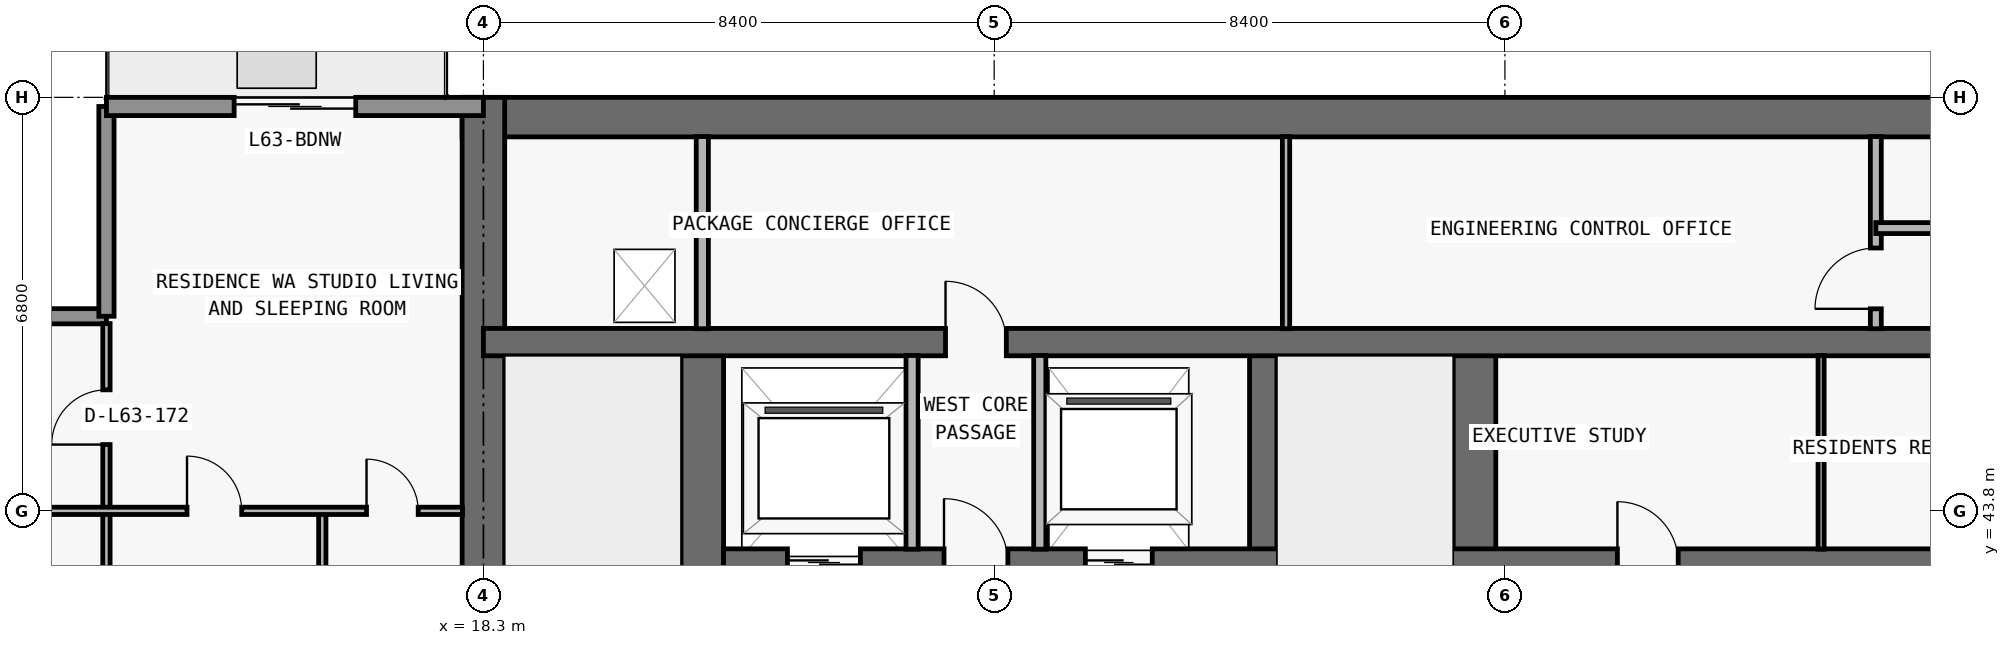
"""IFC4 building model, lengths in metres.
Left out: names, types, materials, properties, quantities, classifications, styles, units other than length and angle.
Written with IfcOpenShell. Run it as: python <this file> out.ifc"""

import sys

from ifc_helpers import new_model, si_unit, direction, frame, frame_2d, origin, place, context, subcontext, project, spatial, rectangle, extrude, element, fill, save


model = new_model("IFC4")
c1 = context("Model", 3, precision=1e-05, world=origin(), true_north=direction((0.0, 1.0)))
c2 = subcontext(c1, "Body", "Model", "MODEL_VIEW")
j1 = project(units=[si_unit("LENGTHUNIT", "METRE"), si_unit("PLANEANGLEUNIT", "RADIAN")], contexts=[c1])
p1 = place(None, origin())
s1 = spatial("IfcSite", under=j1, at=p1, CompositionType="ELEMENT")
p2 = place(p1, origin())
s2 = spatial("IfcBuilding", under=s1, at=p2, CompositionType="ELEMENT")
p3 = place(p2, frame((0.0, 0.0, 226.5)))
s3 = spatial("IfcBuildingStorey", under=s2, at=p3, CompositionType="ELEMENT", Elevation=226.5)
p4 = place(p3, frame((17.95, 50.275, 0.0), z_axis=(0.0, 0.0, 1.0), x_axis=(1.0, 0.0, 0.0)))
e1 = element("IfcWall", 1, at=p4, inside=s3, PredefinedType="SHEAR", context=c2, shape_type="SweptSolid", body=[
    extrude(rectangle(XDim=41.9, YDim=0.65, at=frame_2d((20.95, 0.0))), origin(), (0.0, 0.0, 1.0), 3.05),
])
p5 = place(p3, frame((18.3, 36.65, 0.0), z_axis=(0.0, 0.0, 1.0), x_axis=(0.0, 1.0, 0.0)))
e2 = element("IfcWall", 2, at=p5, inside=s3, PredefinedType="SHEAR", context=c2, shape_type="SweptSolid", body=[
    extrude(rectangle(XDim=13.95, YDim=0.7, at=frame_2d((6.975, 0.0))), origin(), (0.0, 0.0, 1.0), 3.05),
])
p6 = place(p3, frame((21.9, 37.0, 0.0), z_axis=(0.0, 0.0, 1.0), x_axis=(0.0, 1.0, 0.0)))
e3 = element("IfcWall", 3, at=p6, inside=s3, PredefinedType="SHEAR", context=c2, shape_type="SweptSolid", body=[
    extrude(rectangle(XDim=9.575, YDim=0.7, at=frame_2d((4.788, 0.0))), origin(), (0.0, 0.0, 1.0), 3.05),
])
p7 = place(p6, frame((0.55, 0.0, 0.0)))
e4 = element("IfcOpeningElement", 4, at=p7, cuts=e3, PredefinedType="OPENING", context=c2, shape_type="SweptSolid", body=[
    extrude(rectangle(XDim=1.1, YDim=2.15, at=frame_2d((0.55, 1.075))), frame((0.0, 0.36, 0.0), z_axis=(0.0, -1.0, 0.0), x_axis=(1.0, 0.0, 0.0)), (0.0, 0.0, 1.0), 0.72),
])
p8 = place(p3, frame((31.125, 37.0, 0.0), z_axis=(0.0, 0.0, 1.0), x_axis=(0.0, 1.0, 0.0)))
e5 = element("IfcWall", 5, at=p8, inside=s3, PredefinedType="SHEAR", context=c2, shape_type="SweptSolid", body=[
    extrude(rectangle(XDim=9.575, YDim=0.45, at=frame_2d((4.788, 0.0))), origin(), (0.0, 0.0, 1.0), 3.05),
])
p9 = place(p3, frame((34.6, 37.0, 0.0), z_axis=(0.0, 0.0, 1.0), x_axis=(0.0, 1.0, 0.0)))
e6 = element("IfcWall", 6, at=p9, inside=s3, PredefinedType="SHEAR", context=c2, shape_type="SweptSolid", body=[
    extrude(rectangle(XDim=9.575, YDim=0.7, at=frame_2d((4.788, 0.0))), origin(), (0.0, 0.0, 1.0), 3.05),
])
p10 = place(p3, frame((22.25, 42.95, 0.0), z_axis=(0.0, 0.0, 1.0), x_axis=(1.0, 0.0, 0.0)))
e7 = element("IfcWall", 7, at=p10, inside=s3, PredefinedType="SHEAR", context=c2, shape_type="SweptSolid", body=[
    extrude(rectangle(XDim=33.3, YDim=0.45, at=frame_2d((16.65, 0.0))), origin(), (0.0, 0.0, 1.0), 3.05),
])
p11 = place(p10, frame((1.05, 0.0, 0.0)))
e8 = element("IfcOpeningElement", 8, at=p11, cuts=e7, PredefinedType="OPENING", context=c2, shape_type="SweptSolid", body=[
    extrude(rectangle(XDim=1.2, YDim=2.2, at=frame_2d((0.6, 1.1))), frame((0.0, 0.235, 0.0), z_axis=(0.0, -1.0, 0.0), x_axis=(1.0, 0.0, 0.0)), (0.0, 0.0, 1.0), 0.47),
])
p12 = place(p10, frame((31.05, 0.0, 0.0)))
e9 = element("IfcOpeningElement", 9, at=p12, cuts=e7, PredefinedType="OPENING", context=c2, shape_type="SweptSolid", body=[
    extrude(rectangle(XDim=1.2, YDim=2.2, at=frame_2d((0.6, 1.1))), frame((0.0, 0.235, 0.0), z_axis=(0.0, -1.0, 0.0), x_axis=(1.0, 0.0, 0.0)), (0.0, 0.0, 1.0), 0.47),
])
p13 = place(p10, frame((26.45, 0.0, 0.0)))
e10 = element("IfcOpeningElement", 10, at=p13, cuts=e7, PredefinedType="OPENING", context=c2, shape_type="SweptSolid", body=[
    extrude(rectangle(XDim=1.1, YDim=2.2, at=frame_2d((0.55, 1.1))), frame((0.0, 0.235, 0.0), z_axis=(0.0, -1.0, 0.0), x_axis=(1.0, 0.0, 0.0)), (0.0, 0.0, 1.0), 0.47),
])
p14 = place(p10, frame((5.95, 0.0, 0.0)))
e11 = element("IfcOpeningElement", 11, at=p14, cuts=e7, PredefinedType="OPENING", context=c2, shape_type="SweptSolid", body=[
    extrude(rectangle(XDim=1.1, YDim=2.2, at=frame_2d((0.55, 1.1))), frame((0.0, 0.235, 0.0), z_axis=(0.0, -1.0, 0.0), x_axis=(1.0, 0.0, 0.0)), (0.0, 0.0, 1.0), 0.47),
])
p15 = place(p10, frame((3.625, 0.0, 0.0)))
e12 = element("IfcOpeningElement", 12, at=p15, cuts=e7, PredefinedType="OPENING", context=c2, shape_type="SweptSolid", body=[
    extrude(rectangle(XDim=1.05, YDim=2.15, at=frame_2d((0.525, 1.075))), frame((0.0, 0.235, 0.0), z_axis=(0.0, -1.0, 0.0), x_axis=(1.0, 0.0, 0.0)), (0.0, 0.0, 1.0), 0.47),
])
p16 = place(p10, frame((28.675, 0.0, 0.0)))
e13 = element("IfcOpeningElement", 13, at=p16, cuts=e7, PredefinedType="OPENING", context=c2, shape_type="SweptSolid", body=[
    extrude(rectangle(XDim=1.05, YDim=2.15, at=frame_2d((0.525, 1.075))), frame((0.0, 0.235, 0.0), z_axis=(0.0, -1.0, 0.0), x_axis=(1.0, 0.0, 0.0)), (0.0, 0.0, 1.0), 0.47),
])
p17 = place(p10, frame((14.7, 0.0, 0.0)))
e14 = element("IfcOpeningElement", 14, at=p17, cuts=e7, PredefinedType="OPENING", context=c2, shape_type="SweptSolid", body=[
    extrude(rectangle(XDim=1.0, YDim=2.2, at=frame_2d((0.5, 1.1))), frame((0.0, 0.235, 0.0), z_axis=(0.0, -1.0, 0.0), x_axis=(1.0, 0.0, 0.0)), (0.0, 0.0, 1.0), 0.47),
])
p18 = place(p10, frame((21.45, 0.0, 0.0)))
e15 = element("IfcOpeningElement", 15, at=p18, cuts=e7, PredefinedType="OPENING", context=c2, shape_type="SweptSolid", body=[
    extrude(rectangle(XDim=1.0, YDim=2.2, at=frame_2d((0.5, 1.1))), frame((0.0, 0.235, 0.0), z_axis=(0.0, -1.0, 0.0), x_axis=(1.0, 0.0, 0.0)), (0.0, 0.0, 1.0), 0.47),
])
p19 = place(p3, frame((18.3, 46.575, 0.0), z_axis=(0.0, 0.0, 1.0), x_axis=(1.0, 0.0, 0.0)))
e16 = element("IfcWall", 16, at=p19, inside=s3, PredefinedType="SHEAR", context=c2, shape_type="SweptSolid", body=[
    extrude(rectangle(XDim=41.2, YDim=0.45, at=frame_2d((20.6, 0.0))), origin(), (0.0, 0.0, 1.0), 3.05),
])
p20 = place(p19, frame((7.6, 0.0, 0.0)))
e17 = element("IfcOpeningElement", 17, at=p20, cuts=e16, PredefinedType="OPENING", context=c2, shape_type="SweptSolid", body=[
    extrude(rectangle(XDim=1.0, YDim=2.2, at=frame_2d((0.5, 1.1))), frame((0.0, 0.235, 0.0), z_axis=(0.0, -1.0, 0.0), x_axis=(1.0, 0.0, 0.0)), (0.0, 0.0, 1.0), 0.47),
])
p21 = place(p19, frame((32.625, 0.0, 0.0)))
e18 = element("IfcOpeningElement", 18, at=p21, cuts=e16, PredefinedType="OPENING", context=c2, shape_type="SweptSolid", body=[
    extrude(rectangle(XDim=1.05, YDim=2.15, at=frame_2d((0.525, 1.075))), frame((0.0, 0.235, 0.0), z_axis=(0.0, -1.0, 0.0), x_axis=(1.0, 0.0, 0.0)), (0.0, 0.0, 1.0), 0.47),
])
p22 = place(p3, frame((8.25, 47.0, 0.0), z_axis=(0.0, 0.0, 1.0), x_axis=(1.0, 0.0, 0.0)))
e19 = element("IfcWall", 19, at=p22, inside=s3, PredefinedType="ELEMENTEDWALL", context=c2, shape_type="SweptSolid", body=[
    extrude(rectangle(XDim=3.85, YDim=0.25, at=frame_2d((1.925, 0.0))), origin(), (0.0, 0.0, 1.0), 3.05),
])
p23 = place(p3, frame((12.1, 47.0, 0.0), z_axis=(0.0, 0.0, 1.0), x_axis=(0.0, 1.0, 0.0)))
e20 = element("IfcWall", 20, at=p23, inside=s3, PredefinedType="ELEMENTEDWALL", context=c2, shape_type="SweptSolid", body=[
    extrude(rectangle(XDim=3.45, YDim=0.25, at=frame_2d((1.725, 0.0))), origin(), (0.0, 0.0, 1.0), 3.05),
])
p24 = place(p3, frame((12.1, 50.45, 0.0), z_axis=(0.0, 0.0, 1.0), x_axis=(1.0, 0.0, 0.0)))
e21 = element("IfcWall", 21, at=p24, inside=s3, PredefinedType="STANDARD", context=c2, shape_type="SweptSolid", body=[
    extrude(rectangle(XDim=6.2, YDim=0.3, at=frame_2d((3.1, 0.0))), origin(), (0.0, 0.0, 1.0), 3.05),
])
p25 = place(p24, frame((2.1, 0.0, 0.0)))
e22 = element("IfcOpeningElement", 22, at=p25, cuts=e21, PredefinedType="OPENING", context=c2, shape_type="SweptSolid", body=[
    extrude(rectangle(XDim=2.0, YDim=2.3, at=frame_2d((1.0, 1.15))), frame((0.0, 0.16, 0.0), z_axis=(0.0, -1.0, 0.0), x_axis=(1.0, 0.0, 0.0)), (0.0, 0.0, 1.0), 0.32),
])
p26 = place(p3, frame((12.1, 37.005, 0.0), z_axis=(0.0, 0.0, 1.0), x_axis=(0.0, 1.0, 0.0)))
e23 = element("IfcWall", 23, at=p26, inside=s3, PredefinedType="PARTITIONING", context=c2, shape_type="SweptSolid", body=[
    extrude(rectangle(XDim=9.875, YDim=0.12, at=frame_2d((4.938, 0.0))), origin(), (0.0, 0.0, 1.0), 3.05),
])
p27 = place(p26, frame((2.948, 0.0, 0.0)))
e24 = element("IfcOpeningElement", 24, at=p27, cuts=e23, PredefinedType="OPENING", context=c2, shape_type="SweptSolid", body=[
    extrude(rectangle(XDim=0.9, YDim=2.15, at=frame_2d((0.45, 1.075))), frame((0.0, 0.07, 0.0), z_axis=(0.0, -1.0, 0.0), x_axis=(1.0, 0.0, 0.0)), (0.0, 0.0, 1.0), 0.14),
])
p28 = place(p26, frame((7.885, 0.0, 0.0)))
e25 = element("IfcOpeningElement", 25, at=p28, cuts=e23, PredefinedType="OPENING", context=c2, shape_type="SweptSolid", body=[
    extrude(rectangle(XDim=0.9, YDim=2.15, at=frame_2d((0.45, 1.075))), frame((0.0, 0.07, 0.0), z_axis=(0.0, -1.0, 0.0), x_axis=(1.0, 0.0, 0.0)), (0.0, 0.0, 1.0), 0.14),
])
p29 = place(p3, frame((15.65, 37.0, 0.0), z_axis=(0.0, 0.0, 1.0), x_axis=(0.0, 1.0, 0.0)))
e26 = element("IfcWall", 26, at=p29, inside=s3, PredefinedType="PARTITIONING", context=c2, shape_type="SweptSolid", body=[
    extrude(rectangle(XDim=6.8, YDim=0.12, at=frame_2d((3.4, 0.0))), origin(), (0.0, 0.0, 1.0), 3.05),
])
p30 = place(p29, frame((1.207, 0.0, 0.0)))
e27 = element("IfcOpeningElement", 27, at=p30, cuts=e26, PredefinedType="OPENING", context=c2, shape_type="SweptSolid", body=[
    extrude(rectangle(XDim=0.85, YDim=2.1, at=frame_2d((0.425, 1.05))), frame((0.0, 0.07, 0.0), z_axis=(0.0, -1.0, 0.0), x_axis=(1.0, 0.0, 0.0)), (0.0, 0.0, 1.0), 0.14),
])
p31 = place(p3, frame((21.9, 46.795, 0.0), z_axis=(0.0, 0.0, 1.0), x_axis=(0.0, 1.0, 0.0)))
e28 = element("IfcWall", 28, at=p31, inside=s3, PredefinedType="PARTITIONING", context=c2, shape_type="SweptSolid", body=[
    extrude(rectangle(XDim=3.16, YDim=0.2, at=frame_2d((1.58, 0.0))), origin(), (0.0, 0.0, 1.0), 3.05),
])
for number, where, z_axis, x_axis in (
    (29, (25.35, 43.17, 0.0), (0.0, 0.0, 1.0), (0.0, 1.0, 0.0)),
    (30, (27.45, 43.17, 0.0), (0.0, 0.0, 1.0), (0.0, 1.0, 0.0)),
):
    element("IfcWall", number, at=place(p3, frame(where, z_axis=z_axis, x_axis=x_axis)), inside=s3, PredefinedType="PARTITIONING", context=c2, shape_type="SweptSolid", body=[
        extrude(rectangle(XDim=3.185, YDim=0.2, at=frame_2d((1.593, 0.0))), origin(), (0.0, 0.0, 1.0), 3.05),
    ])
p32 = place(p3, frame((31.5, 46.795, 0.0), z_axis=(0.0, 0.0, 1.0), x_axis=(0.0, 1.0, 0.0)))
e31 = element("IfcWall", 31, at=p32, inside=s3, PredefinedType="PARTITIONING", context=c2, shape_type="SweptSolid", body=[
    extrude(rectangle(XDim=3.16, YDim=0.12, at=frame_2d((1.58, 0.0))), origin(), (0.0, 0.0, 1.0), 3.05),
])
p33 = place(p3, frame((40.3, 43.17, 0.0), z_axis=(0.0, 0.0, 1.0), x_axis=(0.0, 1.0, 0.0)))
e32 = element("IfcWall", 32, at=p33, inside=s3, PredefinedType="MOVABLE", context=c2, shape_type="SweptSolid", body=[
    extrude(rectangle(XDim=3.185, YDim=0.1, at=frame_2d((1.593, 0.0))), origin(), (0.0, 0.0, 1.0), 3.05),
])
p34 = place(p3, frame((41.2, 46.795, 0.0), z_axis=(0.0, 0.0, 1.0), x_axis=(0.0, 1.0, 0.0)))
e33 = element("IfcWall", 33, at=p34, inside=s3, PredefinedType="PARTITIONING", context=c2, shape_type="SweptSolid", body=[
    extrude(rectangle(XDim=3.16, YDim=0.18, at=frame_2d((1.58, 0.0))), origin(), (0.0, 0.0, 1.0), 3.05),
])
p35 = place(p34, frame((0.327, 0.0, 0.0)))
e34 = element("IfcOpeningElement", 34, at=p35, cuts=e33, PredefinedType="OPENING", context=c2, shape_type="SweptSolid", body=[
    extrude(rectangle(XDim=1.0, YDim=2.2, at=frame_2d((0.5, 1.1))), frame((0.0, 0.1, 0.0), z_axis=(0.0, -1.0, 0.0), x_axis=(1.0, 0.0, 0.0)), (0.0, 0.0, 1.0), 0.2),
])
p36 = place(p3, frame((8.395, 43.8, 0.0), z_axis=(0.0, 0.0, 1.0), x_axis=(1.0, 0.0, 0.0)))
e35 = element("IfcWall", 35, at=p36, inside=s3, PredefinedType="PARTITIONING", context=c2, shape_type="SweptSolid", body=[
    extrude(rectangle(XDim=9.56, YDim=0.12, at=frame_2d((4.78, 0.0))), origin(), (0.0, 0.0, 1.0), 2.418),
])
p37 = place(p36, frame((5.03, 0.0, 0.0)))
e36 = element("IfcOpeningElement", 36, at=p37, cuts=e35, PredefinedType="OPENING", context=c2, shape_type="SweptSolid", body=[
    extrude(rectangle(XDim=0.9, YDim=2.15, at=frame_2d((0.45, 1.075))), frame((0.0, 0.07, 0.0), z_axis=(0.0, -1.0, 0.0), x_axis=(1.0, 0.0, 0.0)), (0.0, 0.0, 1.0), 0.14),
])
p38 = place(p36, frame((7.982, 0.0, 0.0)))
e37 = element("IfcOpeningElement", 37, at=p38, cuts=e35, PredefinedType="OPENING", context=c2, shape_type="SweptSolid", body=[
    extrude(rectangle(XDim=0.85, YDim=2.1, at=frame_2d((0.425, 1.05))), frame((0.0, 0.07, 0.0), z_axis=(0.0, -1.0, 0.0), x_axis=(1.0, 0.0, 0.0)), (0.0, 0.0, 1.0), 0.14),
])
p39 = place(p3, frame((41.2, 48.45, 0.0), z_axis=(0.0, 0.0, 1.0), x_axis=(1.0, 0.0, 0.0)))
e38 = element("IfcWall", 38, at=p39, inside=s3, PredefinedType="PARTITIONING", context=c2, shape_type="SweptSolid", body=[
    extrude(rectangle(XDim=14.7, YDim=0.18, at=frame_2d((7.35, 0.0))), origin(), (0.0, 0.0, 1.0), 3.05),
])
p40 = place(p39, frame((1.85, 0.0, 0.0)))
e39 = element("IfcOpeningElement", 39, at=p40, cuts=e38, PredefinedType="OPENING", context=c2, shape_type="SweptSolid", body=[
    extrude(rectangle(XDim=1.2, YDim=2.2, at=frame_2d((0.6, 1.1))), frame((0.0, 0.1, 0.0), z_axis=(0.0, -1.0, 0.0), x_axis=(1.0, 0.0, 0.0)), (0.0, 0.0, 1.0), 0.2),
])
p41 = place(p39, frame((6.75, 0.0, 0.0)))
e40 = element("IfcOpeningElement", 40, at=p41, cuts=e38, PredefinedType="OPENING", context=c2, shape_type="SweptSolid", body=[
    extrude(rectangle(XDim=1.2, YDim=2.2, at=frame_2d((0.6, 1.1))), frame((0.0, 0.1, 0.0), z_axis=(0.0, -1.0, 0.0), x_axis=(1.0, 0.0, 0.0)), (0.0, 0.0, 1.0), 0.2),
])
p42 = place(p39, frame((11.825, 0.0, 0.0)))
e41 = element("IfcOpeningElement", 41, at=p42, cuts=e38, PredefinedType="OPENING", context=c2, shape_type="SweptSolid", body=[
    extrude(rectangle(XDim=0.85, YDim=2.1, at=frame_2d((0.425, 1.05))), frame((0.0, 0.1, 0.0), z_axis=(0.0, -1.0, 0.0), x_axis=(1.0, 0.0, 0.0)), (0.0, 0.0, 1.0), 0.2),
])
p43 = place(p25, origin())
e42 = element("IfcDoor", 42, at=p43, inside=s3, OperationType="DOUBLE_DOOR_SLIDING", PredefinedType="DOOR", context=c2, shape_type="SweptSolid", body=[
    extrude(rectangle(XDim=2.0, YDim=2.3, at=frame_2d((1.0, 1.15))), frame((0.0, 0.025, 0.0), z_axis=(0.0, -1.0, 0.0), x_axis=(1.0, 0.0, 0.0)), (0.0, 0.0, 1.0), 0.05),
])
fill(e22, e42)
p44 = place(p11, origin())
e43 = element("IfcDoor", 43, at=p44, inside=s3, OperationType="DOUBLE_DOOR_SLIDING", PredefinedType="DOOR", context=c2, shape_type="SweptSolid", body=[
    extrude(rectangle(XDim=1.2, YDim=2.2, at=frame_2d((0.6, 1.1))), frame((0.0, 0.025, 0.0), z_axis=(0.0, -1.0, 0.0), x_axis=(1.0, 0.0, 0.0)), (0.0, 0.0, 1.0), 0.05),
])
fill(e8, e43)
p45 = place(p14, origin())
e44 = element("IfcDoor", 44, at=p45, inside=s3, OperationType="DOUBLE_DOOR_SLIDING", PredefinedType="DOOR", context=c2, shape_type="SweptSolid", body=[
    extrude(rectangle(XDim=1.1, YDim=2.2, at=frame_2d((0.55, 1.1))), frame((0.0, 0.025, 0.0), z_axis=(0.0, -1.0, 0.0), x_axis=(1.0, 0.0, 0.0)), (0.0, 0.0, 1.0), 0.05),
])
fill(e11, e44)
p46 = place(p15, origin())
e45 = element("IfcDoor", 45, at=p46, inside=s3, OperationType="SINGLE_SWING_LEFT", PredefinedType="DOOR", context=c2, shape_type="SweptSolid", body=[
    extrude(rectangle(XDim=1.05, YDim=2.15, at=frame_2d((0.525, 1.075))), frame((0.0, 0.025, 0.0), z_axis=(0.0, -1.0, 0.0), x_axis=(1.0, 0.0, 0.0)), (0.0, 0.0, 1.0), 0.05),
])
fill(e12, e45)
p47 = place(p17, origin())
e46 = element("IfcDoor", 46, at=p47, inside=s3, OperationType="SINGLE_SWING_LEFT", PredefinedType="DOOR", context=c2, shape_type="SweptSolid", body=[
    extrude(rectangle(XDim=1.0, YDim=2.2, at=frame_2d((0.5, 1.1))), frame((0.0, 0.025, 0.0), z_axis=(0.0, -1.0, 0.0), x_axis=(1.0, 0.0, 0.0)), (0.0, 0.0, 1.0), 0.05),
])
fill(e14, e46)
p48 = place(p20, origin())
e47 = element("IfcDoor", 47, at=p48, inside=s3, OperationType="SINGLE_SWING_LEFT", PredefinedType="DOOR", context=c2, shape_type="SweptSolid", body=[
    extrude(rectangle(XDim=1.0, YDim=2.2, at=frame_2d((0.5, 1.1))), frame((0.0, 0.025, 0.0), z_axis=(0.0, -1.0, 0.0), x_axis=(1.0, 0.0, 0.0)), (0.0, 0.0, 1.0), 0.05),
])
fill(e17, e47)
p49 = place(p35, origin())
e48 = element("IfcDoor", 48, at=p49, inside=s3, OperationType="SINGLE_SWING_LEFT", PredefinedType="DOOR", context=c2, shape_type="SweptSolid", body=[
    extrude(rectangle(XDim=1.0, YDim=2.2, at=frame_2d((0.5, 1.1))), frame((0.0, 0.025, 0.0), z_axis=(0.0, -1.0, 0.0), x_axis=(1.0, 0.0, 0.0)), (0.0, 0.0, 1.0), 0.05),
])
fill(e34, e48)
p50 = place(p37, origin())
e49 = element("IfcDoor", 49, at=p50, inside=s3, OperationType="SINGLE_SWING_LEFT", PredefinedType="DOOR", context=c2, shape_type="SweptSolid", body=[
    extrude(rectangle(XDim=0.9, YDim=2.15, at=frame_2d((0.45, 1.075))), frame((0.0, 0.025, 0.0), z_axis=(0.0, -1.0, 0.0), x_axis=(1.0, 0.0, 0.0)), (0.0, 0.0, 1.0), 0.05),
])
fill(e36, e49)
p51 = place(p38, origin())
e50 = element("IfcDoor", 50, at=p51, inside=s3, OperationType="SINGLE_SWING_LEFT", PredefinedType="DOOR", context=c2, shape_type="SweptSolid", body=[
    extrude(rectangle(XDim=0.85, YDim=2.1, at=frame_2d((0.425, 1.05))), frame((0.0, 0.025, 0.0), z_axis=(0.0, -1.0, 0.0), x_axis=(1.0, 0.0, 0.0)), (0.0, 0.0, 1.0), 0.05),
])
fill(e37, e50)
p52 = place(p28, origin())
e51 = element("IfcDoor", 51, at=p52, inside=s3, OperationType="SINGLE_SWING_LEFT", PredefinedType="DOOR", context=c2, shape_type="SweptSolid", body=[
    extrude(rectangle(XDim=0.9, YDim=2.15, at=frame_2d((0.45, 1.075))), frame((0.0, 0.025, 0.0), z_axis=(0.0, -1.0, 0.0), x_axis=(1.0, 0.0, 0.0)), (0.0, 0.0, 1.0), 0.05),
])
fill(e25, e51)
save(model, sys.argv[1])
